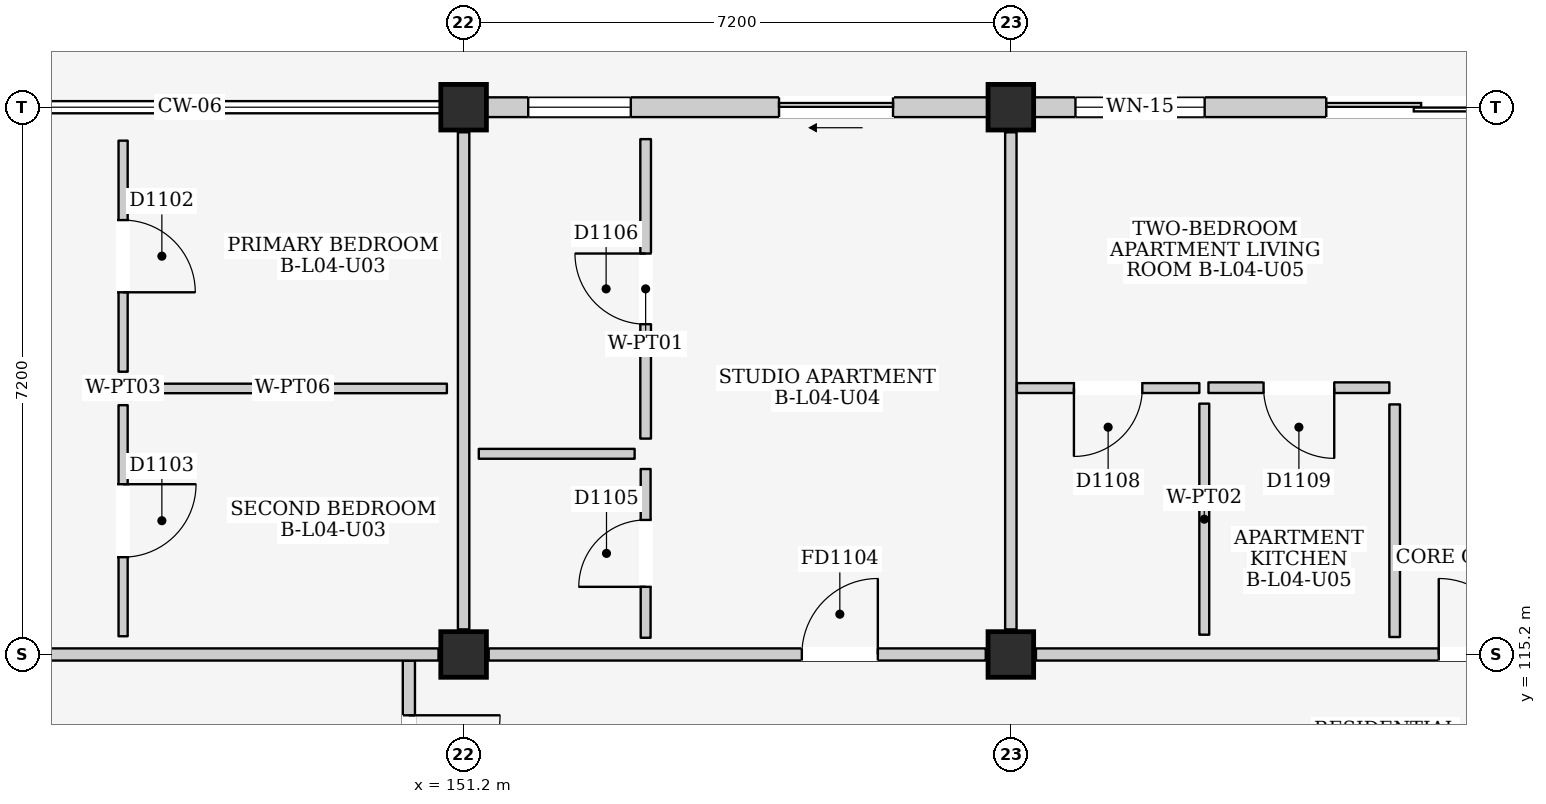
"""IFC4 building model, lengths in metres.
Left out: names, types, materials, properties, quantities, classifications, styles, units other than length and angle.
Written with IfcOpenShell. Run it as: python <this file> out.ifc"""

import sys

from ifc_helpers import new_model, si_unit, direction, frame, frame_2d, origin, origin_2d, place, context, subcontext, project, spatial, rectangle, extrude, element, fill, save


model = new_model("IFC4")
c1 = context("Model", 3, precision=1e-05, world=origin(), true_north=direction((0.0, 1.0)))
c2 = subcontext(c1, "Body", "Model", "MODEL_VIEW")
j1 = project(units=[si_unit("LENGTHUNIT", "METRE"), si_unit("PLANEANGLEUNIT", "RADIAN")], contexts=[c1])
p1 = place(None, origin())
s1 = spatial("IfcSite", under=j1, at=p1, CompositionType="ELEMENT")
p2 = place(p1, origin())
s2 = spatial("IfcBuilding", under=s1, at=p2, CompositionType="ELEMENT")
p3 = place(p2, frame((0.0, 0.0, 15.4)))
s3 = spatial("IfcBuildingStorey", under=s2, at=p3, CompositionType="ELEMENT", Elevation=15.4)
for number, where, z_axis, x_axis in (
    (1, (151.2, 115.2, 0.0), (0.0, 0.0, 1.0), (1.0, 0.0, 0.0)),
    (2, (151.2, 122.4, 0.0), (0.0, 0.0, 1.0), (1.0, 0.0, 0.0)),
    (3, (158.4, 115.2, 0.0), (0.0, 0.0, 1.0), (1.0, 0.0, 0.0)),
    (4, (158.4, 122.4, 0.0), (0.0, 0.0, 1.0), (1.0, 0.0, 0.0)),
):
    element("IfcColumn", number, at=place(p3, frame(where, z_axis=z_axis, x_axis=x_axis)), inside=s3, PredefinedType="COLUMN", context=c2, shape_type="SweptSolid", body=[
        extrude(rectangle(XDim=0.6, YDim=0.6, at=origin_2d()), origin(), (0.0, 0.0, 1.0), 3.2),
    ])
p4 = place(p3, frame((151.5, 122.4, 0.0), z_axis=(0.0, 0.0, 1.0), x_axis=(1.0, 0.0, 0.0)))
e5 = element("IfcWall", 5, at=p4, inside=s3, PredefinedType="ELEMENTEDWALL", context=c2, shape_type="SweptSolid", body=[
    extrude(rectangle(XDim=6.6, YDim=0.26, at=frame_2d((3.3, 0.0))), origin(), (0.0, 0.0, 1.0), 2.43),
])
p5 = place(p4, frame((3.85, 0.0, 0.0)))
e6 = element("IfcOpeningElement", 6, at=p5, cuts=e5, PredefinedType="OPENING", context=c2, shape_type="SweptSolid", body=[
    extrude(rectangle(XDim=1.5, YDim=2.12, at=frame_2d((0.75, 1.06))), frame((0.0, 0.145, 0.0), z_axis=(0.0, -1.0, 0.0), x_axis=(1.0, 0.0, 0.0)), (0.0, 0.0, 1.0), 0.29),
])
p6 = place(p4, frame((0.55, 0.0, 0.81)))
e7 = element("IfcOpeningElement", 7, at=p6, cuts=e5, PredefinedType="OPENING", context=c2, shape_type="SweptSolid", body=[
    extrude(rectangle(XDim=1.35, YDim=1.5, at=frame_2d((0.675, 0.75))), frame((0.0, 0.145, 0.0), z_axis=(0.0, -1.0, 0.0), x_axis=(1.0, 0.0, 0.0)), (0.0, 0.0, 1.0), 0.29),
])
p7 = place(p3, frame((158.7, 122.4, 0.0), z_axis=(0.0, 0.0, 1.0), x_axis=(1.0, 0.0, 0.0)))
e8 = element("IfcWall", 8, at=p7, inside=s3, PredefinedType="ELEMENTEDWALL", context=c2, shape_type="SweptSolid", body=[
    extrude(rectangle(XDim=6.6, YDim=0.26, at=frame_2d((3.3, 0.0))), origin(), (0.0, 0.0, 1.0), 2.43),
])
p8 = place(p7, frame((3.85, 0.0, 0.0)))
e9 = element("IfcOpeningElement", 9, at=p8, cuts=e8, PredefinedType="OPENING", context=c2, shape_type="SweptSolid", body=[
    extrude(rectangle(XDim=2.4, YDim=2.12, at=frame_2d((1.2, 1.06))), frame((0.0, 0.145, 0.0), z_axis=(0.0, -1.0, 0.0), x_axis=(1.0, 0.0, 0.0)), (0.0, 0.0, 1.0), 0.29),
])
p9 = place(p7, frame((0.55, 0.0, 0.86)))
e10 = element("IfcOpeningElement", 10, at=p9, cuts=e8, PredefinedType="OPENING", context=c2, shape_type="SweptSolid", body=[
    extrude(rectangle(XDim=1.7, YDim=1.45, at=frame_2d((0.85, 0.725))), frame((0.0, 0.145, 0.0), z_axis=(0.0, -1.0, 0.0), x_axis=(1.0, 0.0, 0.0)), (0.0, 0.0, 1.0), 0.29),
])
p10 = place(p3, frame((150.48, 111.1, 0.0), z_axis=(0.0, 0.0, 1.0), x_axis=(0.0, 1.0, 0.0)))
e11 = element("IfcWall", 11, at=p10, inside=s3, PredefinedType="PARTITIONING", context=c2, shape_type="SweptSolid", body=[
    extrude(rectangle(XDim=4.02, YDim=0.16, at=frame_2d((2.01, 0.0))), origin(), (0.0, 0.0, 1.0), 2.95),
])
p11 = place(p10, frame((2.1, 0.0, 0.0)))
e12 = element("IfcOpeningElement", 12, at=p11, cuts=e11, PredefinedType="OPENING", context=c2, shape_type="SweptSolid", body=[
    extrude(rectangle(XDim=1.2, YDim=2.2, at=frame_2d((0.6, 1.1))), frame((0.0, 0.095, 0.0), z_axis=(0.0, -1.0, 0.0), x_axis=(1.0, 0.0, 0.0)), (0.0, 0.0, 1.0), 0.19),
])
p12 = place(p3, frame((144.33, 115.2, 0.0), z_axis=(0.0, 0.0, 1.0), x_axis=(1.0, 0.0, 0.0)))
e13 = element("IfcWall", 13, at=p12, inside=s3, PredefinedType="PARTITIONING", context=c2, shape_type="SweptSolid", body=[
    extrude(rectangle(XDim=6.54, YDim=0.16, at=frame_2d((3.27, 0.0))), origin(), (0.0, 0.0, 1.0), 2.335),
])
p13 = place(p3, frame((151.2, 115.53, 0.0), z_axis=(0.0, 0.0, 1.0), x_axis=(0.0, 1.0, 0.0)))
e14 = element("IfcWall", 14, at=p13, inside=s3, PredefinedType="PARTITIONING", context=c2, shape_type="SweptSolid", body=[
    extrude(rectangle(XDim=6.54, YDim=0.15, at=frame_2d((3.27, 0.0))), origin(), (0.0, 0.0, 1.0), 2.385),
])
p14 = place(p3, frame((146.72, 118.92, 0.0), z_axis=(0.0, 0.0, 1.0), x_axis=(0.0, 1.0, 0.0)))
e15 = element("IfcWall", 15, at=p14, inside=s3, PredefinedType="PARTITIONING", context=c2, shape_type="SweptSolid", body=[
    extrude(rectangle(XDim=3.04, YDim=0.12, at=frame_2d((1.52, 0.0))), origin(), (0.0, 0.0, 1.0), 2.95),
])
p15 = place(p14, frame((1.045, 0.0, 0.0)))
e16 = element("IfcOpeningElement", 16, at=p15, cuts=e15, PredefinedType="OPENING", context=c2, shape_type="SweptSolid", body=[
    extrude(rectangle(XDim=0.95, YDim=2.15, at=frame_2d((0.475, 1.075))), frame((0.0, 0.075, 0.0), z_axis=(0.0, -1.0, 0.0), x_axis=(1.0, 0.0, 0.0)), (0.0, 0.0, 1.0), 0.15),
])
p16 = place(p3, frame((146.92, 118.7, 0.0), z_axis=(0.0, 0.0, 1.0), x_axis=(1.0, 0.0, 0.0)))
e17 = element("IfcWall", 17, at=p16, inside=s3, PredefinedType="PARTITIONING", context=c2, shape_type="SweptSolid", body=[
    extrude(rectangle(XDim=4.06, YDim=0.125, at=frame_2d((2.03, 0.0))), origin(), (0.0, 0.0, 1.0), 2.95),
])
p17 = place(p3, frame((146.72, 115.44, 0.0), z_axis=(0.0, 0.0, 1.0), x_axis=(0.0, 1.0, 0.0)))
e18 = element("IfcWall", 18, at=p17, inside=s3, PredefinedType="PARTITIONING", context=c2, shape_type="SweptSolid", body=[
    extrude(rectangle(XDim=3.04, YDim=0.12, at=frame_2d((1.52, 0.0))), origin(), (0.0, 0.0, 1.0), 2.95),
])
p18 = place(p17, frame((1.04, 0.0, 0.0)))
e19 = element("IfcOpeningElement", 19, at=p18, cuts=e18, PredefinedType="OPENING", context=c2, shape_type="SweptSolid", body=[
    extrude(rectangle(XDim=0.96, YDim=2.15, at=frame_2d((0.48, 1.075))), frame((0.0, 0.075, 0.0), z_axis=(0.0, -1.0, 0.0), x_axis=(1.0, 0.0, 0.0)), (0.0, 0.0, 1.0), 0.15),
])
p19 = place(p3, frame((151.53, 115.2, 0.0), z_axis=(0.0, 0.0, 1.0), x_axis=(1.0, 0.0, 0.0)))
e20 = element("IfcWall", 20, at=p19, inside=s3, PredefinedType="PARTITIONING", context=c2, shape_type="SweptSolid", body=[
    extrude(rectangle(XDim=6.54, YDim=0.16, at=frame_2d((3.27, 0.0))), origin(), (0.0, 0.0, 1.0), 2.335),
])
p20 = place(p19, frame((4.12, 0.0, 0.0)))
e21 = element("IfcOpeningElement", 21, at=p20, cuts=e20, PredefinedType="OPENING", context=c2, shape_type="SweptSolid", body=[
    extrude(rectangle(XDim=1.0, YDim=2.15, at=frame_2d((0.5, 1.075))), frame((0.0, 0.095, 0.0), z_axis=(0.0, -1.0, 0.0), x_axis=(1.0, 0.0, 0.0)), (0.0, 0.0, 1.0), 0.19),
])
p21 = place(p3, frame((158.4, 115.53, 0.0), z_axis=(0.0, 0.0, 1.0), x_axis=(0.0, 1.0, 0.0)))
e22 = element("IfcWall", 22, at=p21, inside=s3, PredefinedType="PARTITIONING", context=c2, shape_type="SweptSolid", body=[
    extrude(rectangle(XDim=6.54, YDim=0.15, at=frame_2d((3.27, 0.0))), origin(), (0.0, 0.0, 1.0), 2.385),
])
p22 = place(p3, frame((151.4, 117.84, 0.0), z_axis=(0.0, 0.0, 1.0), x_axis=(1.0, 0.0, 0.0)))
e23 = element("IfcWall", 23, at=p22, inside=s3, PredefinedType="PARTITIONING", context=c2, shape_type="SweptSolid", body=[
    extrude(rectangle(XDim=2.05, YDim=0.13, at=frame_2d((1.025, 0.0))), origin(), (0.0, 0.0, 1.0), 2.95),
])
p23 = place(p3, frame((153.595, 115.42, 0.0), z_axis=(0.0, 0.0, 1.0), x_axis=(0.0, 1.0, 0.0)))
e24 = element("IfcWall", 24, at=p23, inside=s3, PredefinedType="PARTITIONING", context=c2, shape_type="SweptSolid", body=[
    extrude(rectangle(XDim=2.22, YDim=0.13, at=frame_2d((1.11, 0.0))), origin(), (0.0, 0.0, 1.0), 2.95),
])
p24 = place(p23, frame((0.67, 0.0, 0.0)))
e25 = element("IfcOpeningElement", 25, at=p24, cuts=e24, PredefinedType="OPENING", context=c2, shape_type="SweptSolid", body=[
    extrude(rectangle(XDim=0.88, YDim=2.1, at=frame_2d((0.44, 1.05))), frame((0.0, 0.08, 0.0), z_axis=(0.0, -1.0, 0.0), x_axis=(1.0, 0.0, 0.0)), (0.0, 0.0, 1.0), 0.16),
])
p25 = place(p3, frame((153.595, 118.04, 0.0), z_axis=(0.0, 0.0, 1.0), x_axis=(0.0, 1.0, 0.0)))
e26 = element("IfcWall", 26, at=p25, inside=s3, PredefinedType="PARTITIONING", context=c2, shape_type="SweptSolid", body=[
    extrude(rectangle(XDim=3.94, YDim=0.14, at=frame_2d((1.97, 0.0))), origin(), (0.0, 0.0, 1.0), 2.95),
])
p26 = place(p25, frame((1.505, 0.0, 0.0)))
e27 = element("IfcOpeningElement", 27, at=p26, cuts=e26, PredefinedType="OPENING", context=c2, shape_type="SweptSolid", body=[
    extrude(rectangle(XDim=0.93, YDim=2.14, at=frame_2d((0.465, 1.07))), frame((0.0, 0.085, 0.0), z_axis=(0.0, -1.0, 0.0), x_axis=(1.0, 0.0, 0.0)), (0.0, 0.0, 1.0), 0.17),
])
p27 = place(p3, frame((158.73, 115.2, 0.0), z_axis=(0.0, 0.0, 1.0), x_axis=(1.0, 0.0, 0.0)))
e28 = element("IfcWall", 28, at=p27, inside=s3, PredefinedType="PARTITIONING", context=c2, shape_type="SweptSolid", body=[
    extrude(rectangle(XDim=6.54, YDim=0.16, at=frame_2d((3.27, 0.0))), origin(), (0.0, 0.0, 1.0), 2.335),
])
p28 = place(p27, frame((5.3, 0.0, 0.0)))
e29 = element("IfcOpeningElement", 29, at=p28, cuts=e28, PredefinedType="OPENING", context=c2, shape_type="SweptSolid", body=[
    extrude(rectangle(XDim=1.0, YDim=2.15, at=frame_2d((0.5, 1.075))), frame((0.0, 0.095, 0.0), z_axis=(0.0, -1.0, 0.0), x_axis=(1.0, 0.0, 0.0)), (0.0, 0.0, 1.0), 0.19),
])
p29 = place(p3, frame((158.48, 118.705, 0.0), z_axis=(0.0, 0.0, 1.0), x_axis=(1.0, 0.0, 0.0)))
e30 = element("IfcWall", 30, at=p29, inside=s3, PredefinedType="PARTITIONING", context=c2, shape_type="SweptSolid", body=[
    extrude(rectangle(XDim=2.4, YDim=0.13, at=frame_2d((1.2, 0.0))), origin(), (0.0, 0.0, 1.0), 2.95),
])
p30 = place(p29, frame((0.75, 0.0, 0.0)))
e31 = element("IfcOpeningElement", 31, at=p30, cuts=e30, PredefinedType="OPENING", context=c2, shape_type="SweptSolid", body=[
    extrude(rectangle(XDim=0.9, YDim=2.1, at=frame_2d((0.45, 1.05))), frame((0.0, 0.08, 0.0), z_axis=(0.0, -1.0, 0.0), x_axis=(1.0, 0.0, 0.0)), (0.0, 0.0, 1.0), 0.16),
])
p31 = place(p3, frame((160.945, 115.46, 0.0), z_axis=(0.0, 0.0, 1.0), x_axis=(0.0, 1.0, 0.0)))
e32 = element("IfcWall", 32, at=p31, inside=s3, PredefinedType="PARTITIONING", context=c2, shape_type="SweptSolid", body=[
    extrude(rectangle(XDim=3.04, YDim=0.13, at=frame_2d((1.52, 0.0))), origin(), (0.0, 0.0, 1.0), 2.95),
])
p32 = place(p3, frame((161.0, 118.71, 0.0), z_axis=(0.0, 0.0, 1.0), x_axis=(1.0, 0.0, 0.0)))
e33 = element("IfcWall", 33, at=p32, inside=s3, PredefinedType="PARTITIONING", context=c2, shape_type="SweptSolid", body=[
    extrude(rectangle(XDim=2.38, YDim=0.14, at=frame_2d((1.19, 0.0))), origin(), (0.0, 0.0, 1.0), 2.95),
])
p33 = place(p32, frame((0.725, 0.0, 0.0)))
e34 = element("IfcOpeningElement", 34, at=p33, cuts=e33, PredefinedType="OPENING", context=c2, shape_type="SweptSolid", body=[
    extrude(rectangle(XDim=0.93, YDim=2.14, at=frame_2d((0.465, 1.07))), frame((0.0, 0.085, 0.0), z_axis=(0.0, -1.0, 0.0), x_axis=(1.0, 0.0, 0.0)), (0.0, 0.0, 1.0), 0.17),
])
p34 = place(p3, frame((163.45, 115.43, 0.0), z_axis=(0.0, 0.0, 1.0), x_axis=(0.0, 1.0, 0.0)))
e35 = element("IfcWall", 35, at=p34, inside=s3, PredefinedType="PARTITIONING", context=c2, shape_type="SweptSolid", body=[
    extrude(rectangle(XDim=3.06, YDim=0.14, at=frame_2d((1.53, 0.0))), origin(), (0.0, 0.0, 1.0), 2.95),
])
p35 = place(p5, frame((1.5, 0.0, 0.0), z_axis=(0.0, 0.0, 1.0), x_axis=(-1.0, 0.0, 0.0)))
e36 = element("IfcDoor", 36, at=p35, inside=s3, OperationType="SLIDING_TO_LEFT", PredefinedType="DOOR", context=c2, shape_type="SweptSolid", body=[
    extrude(rectangle(XDim=1.5, YDim=2.12, at=frame_2d((0.75, 1.06))), frame((0.0, 0.025, 0.0), z_axis=(0.0, -1.0, 0.0), x_axis=(1.0, 0.0, 0.0)), (0.0, 0.0, 1.0), 0.05),
])
fill(e6, e36)
p36 = place(p6, origin())
e37 = element("IfcWindow", 37, at=p36, inside=s3, PartitioningType="SINGLE_PANEL", PredefinedType="WINDOW", context=c2, shape_type="SweptSolid", body=[
    extrude(rectangle(XDim=1.35, YDim=1.5, at=frame_2d((0.675, 0.75))), frame((0.0, 0.03, 0.0), z_axis=(0.0, -1.0, 0.0), x_axis=(1.0, 0.0, 0.0)), (0.0, 0.0, 1.0), 0.06),
])
fill(e7, e37)
p37 = place(p8, frame((2.4, 0.0, 0.0), z_axis=(0.0, 0.0, 1.0), x_axis=(-1.0, 0.0, 0.0)))
e38 = element("IfcDoor", 38, at=p37, inside=s3, OperationType="DOUBLE_DOOR_SLIDING", PredefinedType="DOOR", context=c2, shape_type="SweptSolid", body=[
    extrude(rectangle(XDim=2.4, YDim=2.12, at=frame_2d((1.2, 1.06))), frame((0.0, 0.025, 0.0), z_axis=(0.0, -1.0, 0.0), x_axis=(1.0, 0.0, 0.0)), (0.0, 0.0, 1.0), 0.05),
])
fill(e9, e38)
p38 = place(p9, origin())
e39 = element("IfcWindow", 39, at=p38, inside=s3, PartitioningType="DOUBLE_PANEL_VERTICAL", PredefinedType="WINDOW", context=c2, shape_type="SweptSolid", body=[
    extrude(rectangle(XDim=1.7, YDim=1.45, at=frame_2d((0.85, 0.725))), frame((0.0, 0.03, 0.0), z_axis=(0.0, -1.0, 0.0), x_axis=(1.0, 0.0, 0.0)), (0.0, 0.0, 1.0), 0.06),
])
fill(e10, e39)
p39 = place(p11, frame((1.2, 0.0, 0.0), z_axis=(0.0, 0.0, 1.0), x_axis=(-1.0, 0.0, 0.0)))
e40 = element("IfcDoor", 40, at=p39, inside=s3, OperationType="SINGLE_SWING_LEFT", PredefinedType="DOOR", context=c2, shape_type="SweptSolid", body=[
    extrude(rectangle(XDim=1.2, YDim=2.2, at=frame_2d((0.6, 1.1))), frame((0.0, 0.025, 0.0), z_axis=(0.0, -1.0, 0.0), x_axis=(1.0, 0.0, 0.0)), (0.0, 0.0, 1.0), 0.05),
])
fill(e12, e40)
p40 = place(p15, frame((0.95, 0.0, 0.0), z_axis=(0.0, 0.0, 1.0), x_axis=(-1.0, 0.0, 0.0)))
e41 = element("IfcDoor", 41, at=p40, inside=s3, OperationType="SINGLE_SWING_RIGHT", PredefinedType="DOOR", context=c2, shape_type="SweptSolid", body=[
    extrude(rectangle(XDim=0.95, YDim=2.15, at=frame_2d((0.475, 1.075))), frame((0.0, 0.025, 0.0), z_axis=(0.0, -1.0, 0.0), x_axis=(1.0, 0.0, 0.0)), (0.0, 0.0, 1.0), 0.05),
])
fill(e16, e41)
p41 = place(p18, frame((0.96, 0.0, 0.0), z_axis=(0.0, 0.0, 1.0), x_axis=(-1.0, 0.0, 0.0)))
e42 = element("IfcDoor", 42, at=p41, inside=s3, OperationType="SINGLE_SWING_LEFT", PredefinedType="DOOR", context=c2, shape_type="SweptSolid", body=[
    extrude(rectangle(XDim=0.96, YDim=2.15, at=frame_2d((0.48, 1.075))), frame((0.0, 0.025, 0.0), z_axis=(0.0, -1.0, 0.0), x_axis=(1.0, 0.0, 0.0)), (0.0, 0.0, 1.0), 0.05),
])
fill(e19, e42)
p42 = place(p20, origin())
e43 = element("IfcDoor", 43, at=p42, inside=s3, OperationType="SINGLE_SWING_RIGHT", PredefinedType="DOOR", context=c2, shape_type="SweptSolid", body=[
    extrude(rectangle(XDim=1.0, YDim=2.15, at=frame_2d((0.5, 1.075))), frame((0.0, 0.025, 0.0), z_axis=(0.0, -1.0, 0.0), x_axis=(1.0, 0.0, 0.0)), (0.0, 0.0, 1.0), 0.05),
])
fill(e21, e43)
p43 = place(p24, origin())
e44 = element("IfcDoor", 44, at=p43, inside=s3, OperationType="SINGLE_SWING_LEFT", PredefinedType="DOOR", context=c2, shape_type="SweptSolid", body=[
    extrude(rectangle(XDim=0.88, YDim=2.1, at=frame_2d((0.44, 1.05))), frame((0.0, 0.025, 0.0), z_axis=(0.0, -1.0, 0.0), x_axis=(1.0, 0.0, 0.0)), (0.0, 0.0, 1.0), 0.05),
])
fill(e25, e44)
p44 = place(p26, origin())
e45 = element("IfcDoor", 45, at=p44, inside=s3, OperationType="SINGLE_SWING_RIGHT", PredefinedType="DOOR", context=c2, shape_type="SweptSolid", body=[
    extrude(rectangle(XDim=0.93, YDim=2.14, at=frame_2d((0.465, 1.07))), frame((0.0, 0.025, 0.0), z_axis=(0.0, -1.0, 0.0), x_axis=(1.0, 0.0, 0.0)), (0.0, 0.0, 1.0), 0.05),
])
fill(e27, e45)
p45 = place(p28, origin())
e46 = element("IfcDoor", 46, at=p45, inside=s3, OperationType="SINGLE_SWING_LEFT", PredefinedType="DOOR", context=c2, shape_type="SweptSolid", body=[
    extrude(rectangle(XDim=1.0, YDim=2.15, at=frame_2d((0.5, 1.075))), frame((0.0, 0.025, 0.0), z_axis=(0.0, -1.0, 0.0), x_axis=(1.0, 0.0, 0.0)), (0.0, 0.0, 1.0), 0.05),
])
fill(e29, e46)
p46 = place(p30, frame((0.9, 0.0, 0.0), z_axis=(0.0, 0.0, 1.0), x_axis=(-1.0, 0.0, 0.0)))
e47 = element("IfcDoor", 47, at=p46, inside=s3, OperationType="SINGLE_SWING_RIGHT", PredefinedType="DOOR", context=c2, shape_type="SweptSolid", body=[
    extrude(rectangle(XDim=0.9, YDim=2.1, at=frame_2d((0.45, 1.05))), frame((0.0, 0.025, 0.0), z_axis=(0.0, -1.0, 0.0), x_axis=(1.0, 0.0, 0.0)), (0.0, 0.0, 1.0), 0.05),
])
fill(e31, e47)
p47 = place(p33, frame((0.93, 0.0, 0.0), z_axis=(0.0, 0.0, 1.0), x_axis=(-1.0, 0.0, 0.0)))
e48 = element("IfcDoor", 48, at=p47, inside=s3, OperationType="SINGLE_SWING_LEFT", PredefinedType="DOOR", context=c2, shape_type="SweptSolid", body=[
    extrude(rectangle(XDim=0.93, YDim=2.14, at=frame_2d((0.465, 1.07))), frame((0.0, 0.025, 0.0), z_axis=(0.0, -1.0, 0.0), x_axis=(1.0, 0.0, 0.0)), (0.0, 0.0, 1.0), 0.05),
])
fill(e34, e48)
save(model, sys.argv[1])
